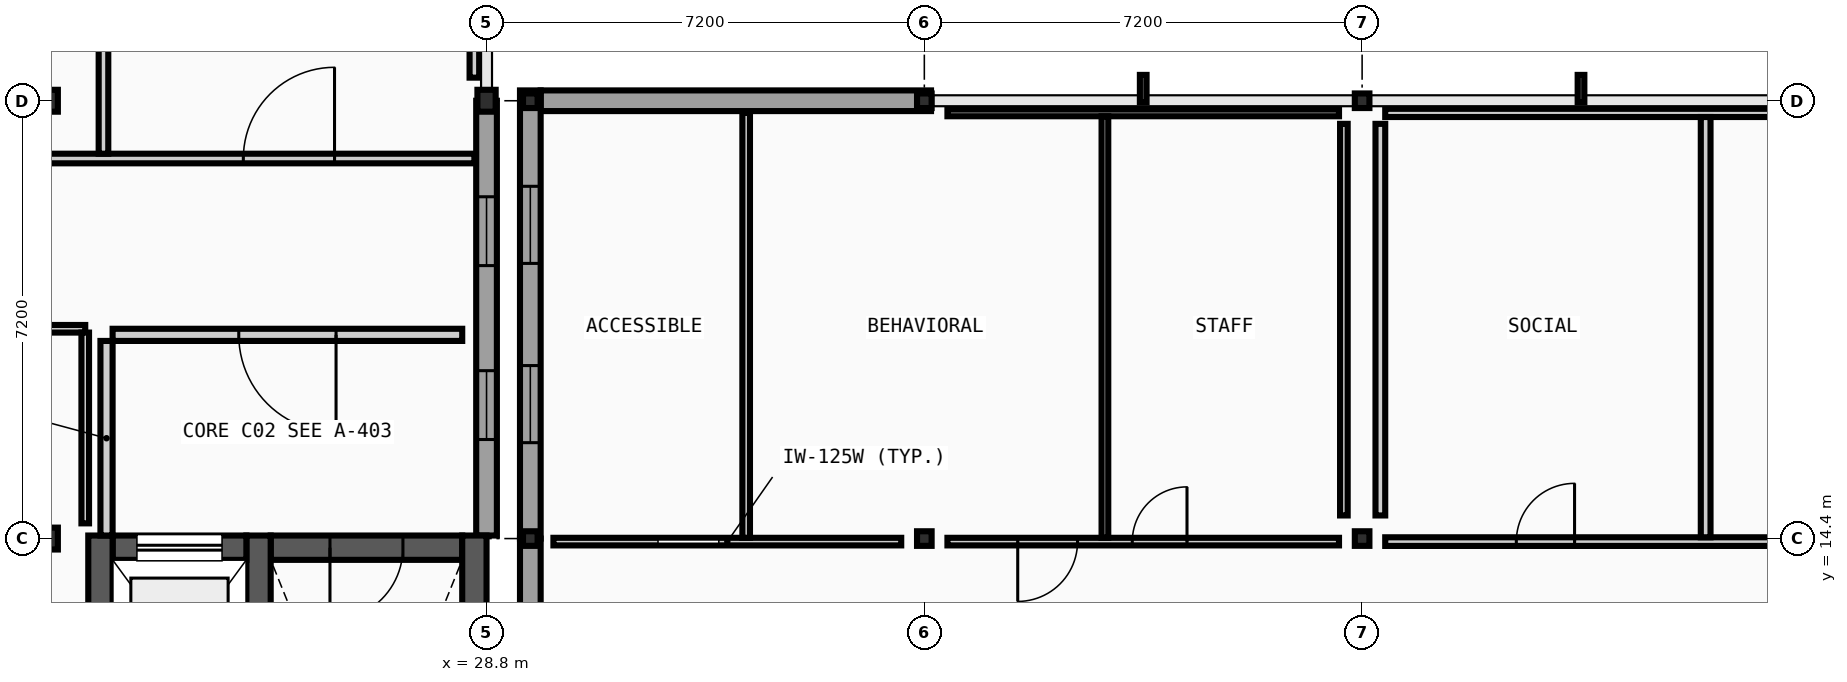
"""IFC4 building model, lengths in metres.
Left out: names, types, materials, properties, quantities, classifications, styles, units other than length and angle.
Written with IfcOpenShell. Run it as: python <this file> out.ifc"""

import sys

from ifc_helpers import new_model, si_unit, direction, frame, frame_2d, origin, origin_2d, place, context, subcontext, project, spatial, rectangle, i_section, extrude, element, fill, save


model = new_model("IFC4")
c1 = context("Model", 3, precision=1e-05, world=origin(), true_north=direction((0.0, 1.0)))
c2 = subcontext(c1, "Body", "Model", "MODEL_VIEW")
j1 = project(units=[si_unit("LENGTHUNIT", "METRE"), si_unit("PLANEANGLEUNIT", "RADIAN")], contexts=[c1])
p1 = place(None, origin())
s1 = spatial("IfcSite", under=j1, at=p1, CompositionType="ELEMENT")
p2 = place(p1, origin())
s2 = spatial("IfcBuilding", under=s1, at=p2, CompositionType="ELEMENT")
p3 = place(p2, frame((0.0, 0.0, 18.4)))
s3 = spatial("IfcBuildingStorey", under=s2, at=p3, CompositionType="ELEMENT", Elevation=18.4)
for number, where, z_axis, x_axis in (
    (1, (21.6, 14.4, 0.0), (0.0, 0.0, 1.0), (1.0, 0.0, 0.0)),
    (2, (21.6, 21.6, 0.0), (0.0, 0.0, 1.0), (1.0, 0.0, 0.0)),
    (3, (28.8, 21.6, 0.0), (0.0, 0.0, 1.0), (1.0, 0.0, 0.0)),
):
    element("IfcColumn", number, at=place(p3, frame(where, z_axis=z_axis, x_axis=x_axis)), inside=s3, PredefinedType="COLUMN", context=c2, shape_type="SweptSolid", body=[
        extrude(i_section(OverallWidth=0.3, OverallDepth=0.36, WebThickness=0.012, FlangeThickness=0.022, FilletRadius=0.027, at=origin_2d()), origin(), (0.0, 0.0, 1.0), 4.4),
    ])
for number, where, z_axis, x_axis in (
    (4, (29.52, 14.4, 0.0), (0.0, 0.0, 1.0), (1.0, 0.0, 0.0)),
    (5, (29.52, 21.6, 0.0), (0.0, 0.0, 1.0), (1.0, 0.0, 0.0)),
    (6, (36.0, 14.4, 0.0), (0.0, 0.0, 1.0), (1.0, 0.0, 0.0)),
    (7, (36.0, 21.6, 0.0), (0.0, 0.0, 1.0), (1.0, 0.0, 0.0)),
    (8, (43.2, 14.4, 0.0), (0.0, 0.0, 1.0), (1.0, 0.0, 0.0)),
    (9, (43.2, 21.6, 0.0), (0.0, 0.0, 1.0), (1.0, 0.0, 0.0)),
):
    element("IfcColumn", number, at=place(p3, frame(where, z_axis=z_axis, x_axis=x_axis)), inside=s3, PredefinedType="COLUMN", context=c2, shape_type="SweptSolid", body=[
        extrude(i_section(OverallWidth=0.24, OverallDepth=0.24, WebThickness=0.01, FlangeThickness=0.017, FilletRadius=0.021, at=origin_2d()), origin(), (0.0, 0.0, 1.0), 4.4),
    ])
p4 = place(p3, frame((28.8, 14.45, 0.0), z_axis=(0.0, 0.0, 1.0), x_axis=(0.0, 1.0, 0.0)))
e10 = element("IfcWall", 10, at=p4, inside=s3, PredefinedType="STANDARD", context=c2, shape_type="SweptSolid", body=[
    extrude(rectangle(XDim=7.15, YDim=0.34, at=frame_2d((3.575, 0.0))), origin(), (0.0, 0.0, 1.0), 4.215),
])
p5 = place(p4, frame((1.579, 0.0, 0.95)))
e11 = element("IfcOpeningElement", 11, at=p5, cuts=e10, PredefinedType="OPENING", context=c2, shape_type="SweptSolid", body=[
    extrude(rectangle(XDim=1.132, YDim=1.404, at=frame_2d((0.566, 0.702))), frame((0.0, 0.18, 0.0), z_axis=(0.0, -1.0, 0.0), x_axis=(1.0, 0.0, 0.0)), (0.0, 0.0, 1.0), 0.36),
])
p6 = place(p4, frame((4.439, 0.0, 0.95)))
e12 = element("IfcOpeningElement", 12, at=p6, cuts=e10, PredefinedType="OPENING", context=c2, shape_type="SweptSolid", body=[
    extrude(rectangle(XDim=1.132, YDim=1.404, at=frame_2d((0.566, 0.702))), frame((0.0, 0.18, 0.0), z_axis=(0.0, -1.0, 0.0), x_axis=(1.0, 0.0, 0.0)), (0.0, 0.0, 1.0), 0.36),
])
p7 = place(p3, frame((36.11, 21.6, 0.0), z_axis=(0.0, 0.0, 1.0), x_axis=(-1.0, 0.0, 0.0)))
e13 = element("IfcWall", 13, at=p7, inside=s3, PredefinedType="STANDARD", context=c2, shape_type="SweptSolid", body=[
    extrude(rectangle(XDim=6.42, YDim=0.34, at=frame_2d((3.21, 0.0))), origin(), (0.0, 0.0, 1.0), 4.035),
])
p8 = place(p3, frame((29.52, 14.4, 0.0), z_axis=(0.0, 0.0, 1.0), x_axis=(0.0, -1.0, 0.0)))
e14 = element("IfcWall", 14, at=p8, inside=s3, PredefinedType="STANDARD", context=c2, shape_type="SweptSolid", body=[
    extrude(rectangle(XDim=5.5, YDim=0.34, at=frame_2d((2.75, 0.0))), origin(), (0.0, 0.0, 1.0), 4.11),
])
p9 = place(p3, frame((29.52, 21.77, 0.0), z_axis=(0.0, 0.0, 1.0), x_axis=(0.0, -1.0, 0.0)))
e15 = element("IfcWall", 15, at=p9, inside=s3, PredefinedType="STANDARD", context=c2, shape_type="SweptSolid", body=[
    extrude(rectangle(XDim=7.37, YDim=0.34, at=frame_2d((3.685, 0.0))), origin(), (0.0, 0.0, 1.0), 4.11),
])
p10 = place(p9, frame((1.577, 0.0, 0.95)))
e16 = element("IfcOpeningElement", 16, at=p10, cuts=e15, PredefinedType="OPENING", context=c2, shape_type="SweptSolid", body=[
    extrude(rectangle(XDim=1.268, YDim=1.404, at=frame_2d((0.634, 0.702))), frame((0.0, 0.18, 0.0), z_axis=(0.0, -1.0, 0.0), x_axis=(1.0, 0.0, 0.0)), (0.0, 0.0, 1.0), 0.36),
])
p11 = place(p9, frame((4.525, 0.0, 0.95)))
e17 = element("IfcOpeningElement", 17, at=p11, cuts=e15, PredefinedType="OPENING", context=c2, shape_type="SweptSolid", body=[
    extrude(rectangle(XDim=1.268, YDim=1.404, at=frame_2d((0.634, 0.702))), frame((0.0, 0.18, 0.0), z_axis=(0.0, -1.0, 0.0), x_axis=(1.0, 0.0, 0.0)), (0.0, 0.0, 1.0), 0.36),
])
p12 = place(p3, frame((25.25, 14.25, 0.0), z_axis=(0.0, 0.0, 1.0), x_axis=(1.0, 0.0, 0.0)))
e18 = element("IfcWall", 18, at=p12, inside=s3, PredefinedType="SHEAR", context=c2, shape_type="SweptSolid", body=[
    extrude(rectangle(XDim=3.15, YDim=0.4, at=frame_2d((1.575, 0.0))), origin(), (0.0, 0.0, 1.0), 4.215),
])
p13 = place(p12, frame((0.975, 0.0, 0.0)))
e19 = element("IfcOpeningElement", 19, at=p13, cuts=e18, PredefinedType="OPENING", context=c2, shape_type="SweptSolid", body=[
    extrude(rectangle(XDim=1.2, YDim=2.15, at=frame_2d((0.6, 1.075))), frame((0.0, 0.21, 0.0), z_axis=(0.0, -1.0, 0.0), x_axis=(1.0, 0.0, 0.0)), (0.0, 0.0, 1.0), 0.42),
])
for number, where, z_axis, x_axis in (
    (20, (25.05, 5.85, 0.0), (0.0, 0.0, 1.0), (0.0, 1.0, 0.0)),
    (21, (28.6, 5.85, 0.0), (0.0, 0.0, 1.0), (0.0, 1.0, 0.0)),
):
    element("IfcWall", number, at=place(p3, frame(where, z_axis=z_axis, x_axis=x_axis)), inside=s3, PredefinedType="SHEAR", context=c2, shape_type="SweptSolid", body=[
        extrude(rectangle(XDim=8.6, YDim=0.4, at=frame_2d((4.3, 0.0))), origin(), (0.0, 0.0, 1.0), 4.215),
    ])
p14 = place(p3, frame((22.65, 14.25, 0.0), z_axis=(0.0, 0.0, 1.0), x_axis=(1.0, 0.0, 0.0)))
e22 = element("IfcWall", 22, at=p14, inside=s3, PredefinedType="SHEAR", context=c2, shape_type="SweptSolid", body=[
    extrude(rectangle(XDim=2.2, YDim=0.4, at=frame_2d((1.1, 0.0))), origin(), (0.0, 0.0, 1.0), 4.215),
])
p15 = place(p14, frame((0.4, 0.0, 0.0)))
e23 = element("IfcOpeningElement", 23, at=p15, cuts=e22, PredefinedType="OPENING", context=c2, shape_type="SweptSolid", body=[
    extrude(rectangle(XDim=1.4, YDim=2.2, at=frame_2d((0.7, 1.1))), frame((0.0, 0.21, 0.0), z_axis=(0.0, -1.0, 0.0), x_axis=(1.0, 0.0, 0.0)), (0.0, 0.0, 1.0), 0.42),
])
p16 = place(p3, frame((22.45, 10.65, 0.0), z_axis=(0.0, 0.0, 1.0), x_axis=(0.0, 1.0, 0.0)))
e24 = element("IfcWall", 24, at=p16, inside=s3, PredefinedType="SHEAR", context=c2, shape_type="SweptSolid", body=[
    extrude(rectangle(XDim=3.8, YDim=0.4, at=frame_2d((1.9, 0.0))), origin(), (0.0, 0.0, 1.0), 4.215),
])
p17 = place(p3, frame((22.65, 17.75, 0.0), z_axis=(0.0, 0.0, 1.0), x_axis=(1.0, 0.0, 0.0)))
e25 = element("IfcWall", 25, at=p17, inside=s3, PredefinedType="PARTITIONING", context=c2, shape_type="SweptSolid", body=[
    extrude(rectangle(XDim=5.75, YDim=0.2, at=frame_2d((2.875, 0.0))), origin(), (0.0, 0.0, 1.0), 4.215),
])
p18 = place(p17, frame((2.075, 0.0, 0.0)))
e26 = element("IfcOpeningElement", 26, at=p18, cuts=e25, PredefinedType="OPENING", context=c2, shape_type="SweptSolid", body=[
    extrude(rectangle(XDim=1.6, YDim=2.2, at=frame_2d((0.8, 1.1))), frame((0.0, 0.11, 0.0), z_axis=(0.0, -1.0, 0.0), x_axis=(1.0, 0.0, 0.0)), (0.0, 0.0, 1.0), 0.22),
])
p19 = place(p3, frame((22.55, 14.45, 0.0), z_axis=(0.0, 0.0, 1.0), x_axis=(0.0, 1.0, 0.0)))
e27 = element("IfcWall", 27, at=p19, inside=s3, PredefinedType="PARTITIONING", context=c2, shape_type="SweptSolid", body=[
    extrude(rectangle(XDim=3.2, YDim=0.2, at=frame_2d((1.6, 0.0))), origin(), (0.0, 0.0, 1.0), 4.215),
])
p20 = place(p3, frame((29.9, 14.35, 0.0), z_axis=(0.0, 0.0, 1.0), x_axis=(1.0, 0.0, 0.0)))
e28 = element("IfcWall", 28, at=p20, inside=s3, PredefinedType="PARTITIONING", context=c2, shape_type="SweptSolid", body=[
    extrude(rectangle(XDim=5.72, YDim=0.125, at=frame_2d((2.86, 0.0))), origin(), (0.0, 0.0, 1.0), 4.035),
])
p21 = place(p20, frame((1.72, 0.0, 0.0)))
e29 = element("IfcOpeningElement", 29, at=p21, cuts=e28, PredefinedType="OPENING", context=c2, shape_type="SweptSolid", body=[
    extrude(rectangle(XDim=1.0, YDim=2.1, at=frame_2d((0.5, 1.05))), frame((0.0, 0.073, 0.0), z_axis=(0.0, -1.0, 0.0), x_axis=(1.0, 0.0, 0.0)), (0.0, 0.0, 1.0), 0.145),
])
p22 = place(p3, frame((36.38, 14.35, 0.0), z_axis=(0.0, 0.0, 1.0), x_axis=(1.0, 0.0, 0.0)))
e30 = element("IfcWall", 30, at=p22, inside=s3, PredefinedType="PARTITIONING", context=c2, shape_type="SweptSolid", body=[
    extrude(rectangle(XDim=6.44, YDim=0.125, at=frame_2d((3.22, 0.0))), origin(), (0.0, 0.0, 1.0), 4.035),
])
p23 = place(p22, frame((3.04, 0.0, 0.0)))
e31 = element("IfcOpeningElement", 31, at=p23, cuts=e30, PredefinedType="OPENING", context=c2, shape_type="SweptSolid", body=[
    extrude(rectangle(XDim=0.9, YDim=2.1, at=frame_2d((0.45, 1.05))), frame((0.0, 0.073, 0.0), z_axis=(0.0, -1.0, 0.0), x_axis=(1.0, 0.0, 0.0)), (0.0, 0.0, 1.0), 0.145),
])
p24 = place(p22, frame((1.156, 0.0, 0.0)))
e32 = element("IfcOpeningElement", 32, at=p24, cuts=e30, PredefinedType="OPENING", context=c2, shape_type="SweptSolid", body=[
    extrude(rectangle(XDim=0.984, YDim=2.068, at=frame_2d((0.492, 1.034))), frame((0.0, 0.073, 0.0), z_axis=(0.0, -1.0, 0.0), x_axis=(1.0, 0.0, 0.0)), (0.0, 0.0, 1.0), 0.145),
])
p25 = place(p3, frame((43.58, 14.35, 0.0), z_axis=(0.0, 0.0, 1.0), x_axis=(1.0, 0.0, 0.0)))
e33 = element("IfcWall", 33, at=p25, inside=s3, PredefinedType="PARTITIONING", context=c2, shape_type="SweptSolid", body=[
    extrude(rectangle(XDim=6.44, YDim=0.142, at=frame_2d((3.22, 0.0))), origin(), (0.0, 0.0, 1.0), 4.035),
])
p26 = place(p25, frame((2.156, 0.0, 0.0)))
e34 = element("IfcOpeningElement", 34, at=p26, cuts=e33, PredefinedType="OPENING", context=c2, shape_type="SweptSolid", body=[
    extrude(rectangle(XDim=0.958, YDim=2.068, at=frame_2d((0.479, 1.034))), frame((0.0, 0.081, 0.0), z_axis=(0.0, -1.0, 0.0), x_axis=(1.0, 0.0, 0.0)), (0.0, 0.0, 1.0), 0.162),
])
p27 = place(p3, frame((9.45, 17.85, 0.0), z_axis=(0.0, 0.0, 1.0), x_axis=(1.0, 0.0, 0.0)))
e35 = element("IfcWall", 35, at=p27, inside=s3, PredefinedType="PARTITIONING", context=c2, shape_type="SweptSolid", body=[
    extrude(rectangle(XDim=12.75, YDim=0.125, at=frame_2d((6.375, 0.0))), origin(), (0.0, 0.0, 1.0), 4.215),
])
p28 = place(p27, frame((7.85, 0.0, 0.0)))
e36 = element("IfcOpeningElement", 36, at=p28, cuts=e35, PredefinedType="OPENING", context=c2, shape_type="SweptSolid", body=[
    extrude(rectangle(XDim=1.0, YDim=2.1, at=frame_2d((0.5, 1.05))), frame((0.0, 0.073, 0.0), z_axis=(0.0, -1.0, 0.0), x_axis=(1.0, 0.0, 0.0)), (0.0, 0.0, 1.0), 0.145),
])
p29 = place(p27, frame((0.45, 0.0, 0.0)))
e37 = element("IfcOpeningElement", 37, at=p29, cuts=e35, PredefinedType="OPENING", context=c2, shape_type="SweptSolid", body=[
    extrude(rectangle(XDim=0.9, YDim=2.1, at=frame_2d((0.45, 1.05))), frame((0.0, 0.073, 0.0), z_axis=(0.0, -1.0, 0.0), x_axis=(1.0, 0.0, 0.0)), (0.0, 0.0, 1.0), 0.145),
])
p30 = place(p3, frame((14.7, 20.65, 0.0), z_axis=(0.0, 0.0, 1.0), x_axis=(1.0, 0.0, 0.0)))
e38 = element("IfcWall", 38, at=p30, inside=s3, PredefinedType="PARTITIONING", context=c2, shape_type="SweptSolid", body=[
    extrude(rectangle(XDim=13.9, YDim=0.158, at=frame_2d((6.95, 0.0))), origin(), (0.0, 0.0, 1.0), 4.215),
])
p31 = place(p30, frame((10.1, 0.0, 0.0)))
e39 = element("IfcOpeningElement", 39, at=p31, cuts=e38, PredefinedType="OPENING", context=c2, shape_type="SweptSolid", body=[
    extrude(rectangle(XDim=1.5, YDim=2.2, at=frame_2d((0.75, 1.1))), frame((0.0, 0.089, 0.0), z_axis=(0.0, -1.0, 0.0), x_axis=(1.0, 0.0, 0.0)), (0.0, 0.0, 1.0), 0.178),
])
p32 = place(p30, frame((3.434, 0.0, 0.0)))
e40 = element("IfcOpeningElement", 40, at=p32, cuts=e38, PredefinedType="OPENING", context=c2, shape_type="SweptSolid", body=[
    extrude(rectangle(XDim=0.932, YDim=2.068, at=frame_2d((0.466, 1.034))), frame((0.0, 0.089, 0.0), z_axis=(0.0, -1.0, 0.0), x_axis=(1.0, 0.0, 0.0)), (0.0, 0.0, 1.0), 0.178),
])
p33 = place(p3, frame((36.38, 21.4, 0.0), z_axis=(0.0, 0.0, 1.0), x_axis=(1.0, 0.0, 0.0)))
e41 = element("IfcWall", 41, at=p33, inside=s3, PredefinedType="PARTITIONING", context=c2, shape_type="SweptSolid", body=[
    extrude(rectangle(XDim=6.44, YDim=0.11, at=frame_2d((3.22, 0.0))), origin(), (0.0, 0.0, 1.0), 4.035),
])
p34 = place(p3, frame((43.58, 21.4, 0.0), z_axis=(0.0, 0.0, 1.0), x_axis=(1.0, 0.0, 0.0)))
e42 = element("IfcWall", 42, at=p34, inside=s3, PredefinedType="PARTITIONING", context=c2, shape_type="SweptSolid", body=[
    extrude(rectangle(XDim=6.44, YDim=0.135, at=frame_2d((3.22, 0.0))), origin(), (0.0, 0.0, 1.0), 4.035),
])
p35 = place(p3, frame((22.2, 14.65, 0.0), z_axis=(0.0, 0.0, 1.0), x_axis=(0.0, 1.0, 0.0)))
e43 = element("IfcWall", 43, at=p35, inside=s3, PredefinedType="PARTITIONING", context=c2, shape_type="SweptSolid", body=[
    extrude(rectangle(XDim=3.138, YDim=0.125, at=frame_2d((1.569, 0.0))), origin(), (0.0, 0.0, 1.0), 4.215),
])
p36 = place(p3, frame((22.5, 20.729, 0.0), z_axis=(0.0, 0.0, 1.0), x_axis=(0.0, 1.0, 0.0)))
e44 = element("IfcWall", 44, at=p36, inside=s3, PredefinedType="PARTITIONING", context=c2, shape_type="SweptSolid", body=[
    extrude(rectangle(XDim=29.471, YDim=0.158, at=frame_2d((14.735, 0.0))), origin(), (0.0, 0.0, 1.0), 4.215),
])
p37 = place(p3, frame((28.6, 21.98, 0.0), z_axis=(0.0, 0.0, 1.0), x_axis=(0.0, 1.0, 0.0)))
e45 = element("IfcWall", 45, at=p37, inside=s3, PredefinedType="PARTITIONING", context=c2, shape_type="SweptSolid", body=[
    extrude(rectangle(XDim=6.44, YDim=0.158, at=frame_2d((3.22, 0.0))), origin(), (0.0, 0.0, 1.0), 3.9),
])
p38 = place(p3, frame((33.07, 14.413, 0.0), z_axis=(0.0, 0.0, 1.0), x_axis=(0.0, 1.0, 0.0)))
e46 = element("IfcWall", 46, at=p38, inside=s3, PredefinedType="PARTITIONING", context=c2, shape_type="SweptSolid", body=[
    extrude(rectangle(XDim=6.987, YDim=0.125, at=frame_2d((3.494, 0.0))), origin(), (0.0, 0.0, 1.0), 4.18),
])
p39 = place(p3, frame((38.97, 14.413, 0.0), z_axis=(0.0, 0.0, 1.0), x_axis=(0.0, 1.0, 0.0)))
e47 = element("IfcWall", 47, at=p39, inside=s3, PredefinedType="PARTITIONING", context=c2, shape_type="SweptSolid", body=[
    extrude(rectangle(XDim=6.932, YDim=0.11, at=frame_2d((3.466, 0.0))), origin(), (0.0, 0.0, 1.0), 4.18),
])
p40 = place(p3, frame((42.9, 14.78, 0.0), z_axis=(0.0, 0.0, 1.0), x_axis=(0.0, 1.0, 0.0)))
e48 = element("IfcWall", 48, at=p40, inside=s3, PredefinedType="PARTITIONING", context=c2, shape_type="SweptSolid", body=[
    extrude(rectangle(XDim=6.44, YDim=0.125, at=frame_2d((3.22, 0.0))), origin(), (0.0, 0.0, 1.0), 4.18),
])
p41 = place(p3, frame((43.5, 14.78, 0.0), z_axis=(0.0, 0.0, 1.0), x_axis=(0.0, 1.0, 0.0)))
e49 = element("IfcWall", 49, at=p41, inside=s3, PredefinedType="PARTITIONING", context=c2, shape_type="SweptSolid", body=[
    extrude(rectangle(XDim=6.44, YDim=0.16, at=frame_2d((3.22, 0.0))), origin(), (0.0, 0.0, 1.0), 4.18),
])
p42 = place(p3, frame((48.85, 14.421, 0.0), z_axis=(0.0, 0.0, 1.0), x_axis=(0.0, 1.0, 0.0)))
e50 = element("IfcWall", 50, at=p42, inside=s3, PredefinedType="PARTITIONING", context=c2, shape_type="SweptSolid", body=[
    extrude(rectangle(XDim=6.912, YDim=0.16, at=frame_2d((3.456, 0.0))), origin(), (0.0, 0.0, 1.0), 4.18),
])
p43 = place(p5, origin())
e51 = element("IfcWindow", 51, at=p43, inside=s3, PartitioningType="SINGLE_PANEL", PredefinedType="WINDOW", context=c2, shape_type="SweptSolid", body=[
    extrude(rectangle(XDim=1.132, YDim=1.404, at=frame_2d((0.566, 0.702))), frame((0.0, 0.03, 0.0), z_axis=(0.0, -1.0, 0.0), x_axis=(1.0, 0.0, 0.0)), (0.0, 0.0, 1.0), 0.06),
])
fill(e11, e51)
p44 = place(p6, origin())
e52 = element("IfcWindow", 52, at=p44, inside=s3, PartitioningType="SINGLE_PANEL", PredefinedType="WINDOW", context=c2, shape_type="SweptSolid", body=[
    extrude(rectangle(XDim=1.132, YDim=1.404, at=frame_2d((0.566, 0.702))), frame((0.0, 0.03, 0.0), z_axis=(0.0, -1.0, 0.0), x_axis=(1.0, 0.0, 0.0)), (0.0, 0.0, 1.0), 0.06),
])
fill(e12, e52)
p45 = place(p10, origin())
e53 = element("IfcWindow", 53, at=p45, inside=s3, PartitioningType="SINGLE_PANEL", PredefinedType="WINDOW", context=c2, shape_type="SweptSolid", body=[
    extrude(rectangle(XDim=1.268, YDim=1.404, at=frame_2d((0.634, 0.702))), frame((0.0, 0.03, 0.0), z_axis=(0.0, -1.0, 0.0), x_axis=(1.0, 0.0, 0.0)), (0.0, 0.0, 1.0), 0.06),
])
fill(e16, e53)
p46 = place(p11, origin())
e54 = element("IfcWindow", 54, at=p46, inside=s3, PartitioningType="SINGLE_PANEL", PredefinedType="WINDOW", context=c2, shape_type="SweptSolid", body=[
    extrude(rectangle(XDim=1.268, YDim=1.404, at=frame_2d((0.634, 0.702))), frame((0.0, 0.03, 0.0), z_axis=(0.0, -1.0, 0.0), x_axis=(1.0, 0.0, 0.0)), (0.0, 0.0, 1.0), 0.06),
])
fill(e17, e54)
p47 = place(p13, frame((1.2, 0.0, 0.0), z_axis=(0.0, 0.0, 1.0), x_axis=(-1.0, 0.0, 0.0)))
e55 = element("IfcDoor", 55, at=p47, inside=s3, OperationType="SINGLE_SWING_LEFT", PredefinedType="DOOR", context=c2, shape_type="SweptSolid", body=[
    extrude(rectangle(XDim=1.2, YDim=2.15, at=frame_2d((0.6, 1.075))), frame((0.0, 0.025, 0.0), z_axis=(0.0, -1.0, 0.0), x_axis=(1.0, 0.0, 0.0)), (0.0, 0.0, 1.0), 0.05),
])
fill(e19, e55)
p48 = place(p15, origin())
e56 = element("IfcDoor", 56, at=p48, inside=s3, OperationType="SLIDING_TO_LEFT", PredefinedType="DOOR", context=c2, shape_type="SweptSolid", body=[
    extrude(rectangle(XDim=1.4, YDim=2.2, at=frame_2d((0.7, 1.1))), frame((0.0, 0.025, 0.0), z_axis=(0.0, -1.0, 0.0), x_axis=(1.0, 0.0, 0.0)), (0.0, 0.0, 1.0), 0.05),
])
fill(e23, e56)
p49 = place(p18, origin())
e57 = element("IfcDoor", 57, at=p49, inside=s3, OperationType="DOUBLE_DOOR_SINGLE_SWING", PredefinedType="DOOR", context=c2, shape_type="SweptSolid", body=[
    extrude(rectangle(XDim=1.6, YDim=2.2, at=frame_2d((0.8, 1.1))), frame((0.0, 0.025, 0.0), z_axis=(0.0, -1.0, 0.0), x_axis=(1.0, 0.0, 0.0)), (0.0, 0.0, 1.0), 0.05),
])
fill(e26, e57)
p50 = place(p31, frame((1.5, 0.0, 0.0), z_axis=(0.0, 0.0, 1.0), x_axis=(-1.0, 0.0, 0.0)))
e58 = element("IfcDoor", 58, at=p50, inside=s3, OperationType="DOUBLE_DOOR_SINGLE_SWING", PredefinedType="DOOR", context=c2, shape_type="SweptSolid", body=[
    extrude(rectangle(XDim=1.5, YDim=2.2, at=frame_2d((0.75, 1.1))), frame((0.0, 0.025, 0.0), z_axis=(0.0, -1.0, 0.0), x_axis=(1.0, 0.0, 0.0)), (0.0, 0.0, 1.0), 0.05),
])
fill(e39, e58)
p51 = place(p21, frame((1.0, 0.0, 0.0), z_axis=(0.0, 0.0, 1.0), x_axis=(-1.0, 0.0, 0.0)))
e59 = element("IfcDoor", 59, at=p51, inside=s3, OperationType="SLIDING_TO_LEFT", PredefinedType="DOOR", context=c2, shape_type="SweptSolid", body=[
    extrude(rectangle(XDim=1.0, YDim=2.1, at=frame_2d((0.5, 1.05))), frame((0.0, 0.025, 0.0), z_axis=(0.0, -1.0, 0.0), x_axis=(1.0, 0.0, 0.0)), (0.0, 0.0, 1.0), 0.05),
])
fill(e29, e59)
p52 = place(p23, frame((0.9, 0.0, 0.0), z_axis=(0.0, 0.0, 1.0), x_axis=(-1.0, 0.0, 0.0)))
e60 = element("IfcDoor", 60, at=p52, inside=s3, OperationType="SINGLE_SWING_RIGHT", PredefinedType="DOOR", context=c2, shape_type="SweptSolid", body=[
    extrude(rectangle(XDim=0.9, YDim=2.1, at=frame_2d((0.45, 1.05))), frame((0.0, 0.025, 0.0), z_axis=(0.0, -1.0, 0.0), x_axis=(1.0, 0.0, 0.0)), (0.0, 0.0, 1.0), 0.05),
])
fill(e31, e60)
p53 = place(p26, frame((0.958, 0.0, 0.0), z_axis=(0.0, 0.0, 1.0), x_axis=(-1.0, 0.0, 0.0)))
e61 = element("IfcDoor", 61, at=p53, inside=s3, OperationType="SINGLE_SWING_RIGHT", PredefinedType="DOOR", context=c2, shape_type="SweptSolid", body=[
    extrude(rectangle(XDim=0.958, YDim=2.068, at=frame_2d((0.479, 1.034))), frame((0.0, 0.025, 0.0), z_axis=(0.0, -1.0, 0.0), x_axis=(1.0, 0.0, 0.0)), (0.0, 0.0, 1.0), 0.05),
])
fill(e34, e61)
p54 = place(p24, frame((0.984, 0.0, 0.0), z_axis=(0.0, 0.0, 1.0), x_axis=(-1.0, 0.0, 0.0)))
e62 = element("IfcDoor", 62, at=p54, inside=s3, OperationType="SINGLE_SWING_LEFT", PredefinedType="DOOR", context=c2, shape_type="SweptSolid", body=[
    extrude(rectangle(XDim=0.984, YDim=2.068, at=frame_2d((0.492, 1.034))), frame((0.0, 0.025, 0.0), z_axis=(0.0, -1.0, 0.0), x_axis=(1.0, 0.0, 0.0)), (0.0, 0.0, 1.0), 0.05),
])
fill(e32, e62)
save(model, sys.argv[1])
